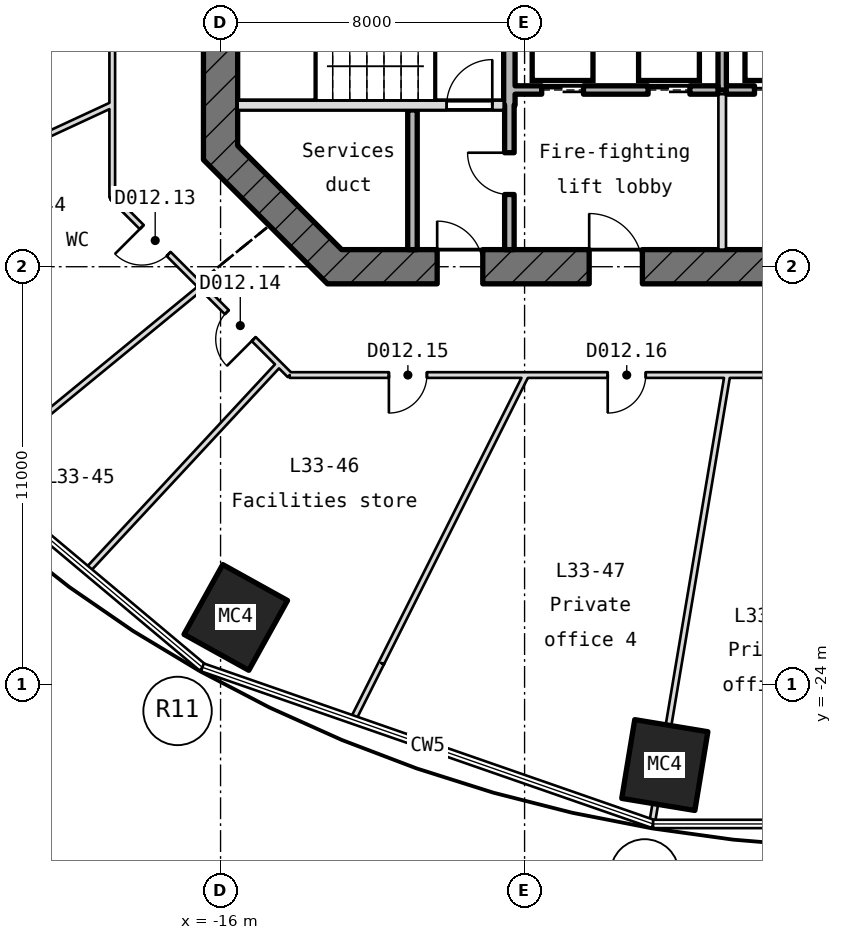
"""IFC4 building model, lengths in metres.
Left out: names, types, materials, properties, quantities, classifications, styles, units other than length and angle.
Written with IfcOpenShell. Run it as: python <this file> out.ifc"""

import sys

from ifc_helpers import new_model, si_unit, direction, frame, frame_2d, origin, origin_2d, place, context, subcontext, project, spatial, rectangle, hollow_rectangle, extrude, element, fill, save


model = new_model("IFC4")
c1 = context("Model", 3, precision=1e-05, world=origin(), true_north=direction((0.0, 1.0)))
c2 = subcontext(c1, "Body", "Model", "MODEL_VIEW")
j1 = project(units=[si_unit("LENGTHUNIT", "METRE"), si_unit("PLANEANGLEUNIT", "RADIAN")], contexts=[c1])
p1 = place(None, origin())
s1 = spatial("IfcSite", under=j1, at=p1, CompositionType="ELEMENT")
p2 = place(p1, origin())
s2 = spatial("IfcBuilding", under=s1, at=p2, CompositionType="ELEMENT")
p3 = place(p2, frame((0.0, 0.0, 155.65)))
s3 = spatial("IfcBuildingStorey", under=s2, at=p3, CompositionType="ELEMENT", Elevation=155.65)
for number, where, z_axis, x_axis in (
    (1, (-15.6, -22.228, -0.25), (0.0, 0.0, 1.0), (-0.874, 0.485, 0.0)),
    (2, (-4.31, -26.112, -0.25), (0.0, 0.0, 1.0), (-0.987, 0.163, 0.0)),
):
    element("IfcColumn", number, at=place(p3, frame(where, z_axis=z_axis, x_axis=x_axis)), inside=s3, PredefinedType="COLUMN", context=c2, shape_type="SweptSolid", body=[
        extrude(hollow_rectangle(XDim=1.95, YDim=2.1, WallThickness=0.075, at=origin_2d()), origin(), (0.0, 0.0, 1.0), 5.47),
    ])
p4 = place(p3, frame((-16.0, 10.186, -0.25), z_axis=(0.0, 0.0, 1.0), x_axis=(0.0, -1.0, 0.0)))
e3 = element("IfcWall", 3, at=p4, inside=s3, PredefinedType="SHEAR", context=c2, shape_type="SweptSolid", body=[
    extrude(rectangle(XDim=20.373, YDim=0.9, at=frame_2d((10.186, 0.0))), origin(), (0.0, 0.0, 1.0), 5.47),
])
p5 = place(p4, frame((8.986, 0.0, 0.25)))
e4 = element("IfcOpeningElement", 4, at=p5, cuts=e3, PredefinedType="OPENING", context=c2, shape_type="SweptSolid", body=[
    extrude(rectangle(XDim=2.4, YDim=2.1, at=frame_2d((1.2, 1.05))), frame((0.0, 0.46, 0.0), z_axis=(0.0, -1.0, 0.0), x_axis=(1.0, 0.0, 0.0)), (0.0, 0.0, 1.0), 0.92),
])
p6 = place(p4, frame((5.586, 0.0, 0.25)))
e5 = element("IfcOpeningElement", 5, at=p6, cuts=e3, PredefinedType="OPENING", context=c2, shape_type="SweptSolid", body=[
    extrude(rectangle(XDim=1.2, YDim=2.1, at=frame_2d((0.6, 1.05))), frame((0.0, 0.46, 0.0), z_axis=(0.0, -1.0, 0.0), x_axis=(1.0, 0.0, 0.0)), (0.0, 0.0, 1.0), 0.92),
])
p7 = place(p3, frame((-16.132, -9.868, -0.25), z_axis=(0.0, 0.0, 1.0), x_axis=(0.707106781187, -0.707106781187, 0.0)))
e6 = element("IfcWall", 6, at=p7, inside=s3, PredefinedType="SHEAR", context=c2, shape_type="SweptSolid", body=[
    extrude(rectangle(XDim=4.615, YDim=0.9, at=frame_2d((2.308, 0.0))), origin(), (0.0, 0.0, 1.0), 5.47),
])
p8 = place(p3, frame((-13.186, -13.0, -0.25), z_axis=(0.0, 0.0, 1.0), x_axis=(1.0, 0.0, 0.0)))
e7 = element("IfcWall", 7, at=p8, inside=s3, PredefinedType="SHEAR", context=c2, shape_type="SweptSolid", body=[
    extrude(rectangle(XDim=26.373, YDim=0.9, at=frame_2d((13.186, 0.0))), origin(), (0.0, 0.0, 1.0), 5.47),
])
p9 = place(p8, frame((2.886, 0.0, 0.25)))
e8 = element("IfcOpeningElement", 8, at=p9, cuts=e7, PredefinedType="OPENING", context=c2, shape_type="SweptSolid", body=[
    extrude(rectangle(XDim=1.2, YDim=2.1, at=frame_2d((0.6, 1.05))), frame((0.0, 0.46, 0.0), z_axis=(0.0, -1.0, 0.0), x_axis=(1.0, 0.0, 0.0)), (0.0, 0.0, 1.0), 0.92),
])
p10 = place(p8, frame((6.886, 0.0, 0.25)))
e9 = element("IfcOpeningElement", 9, at=p10, cuts=e7, PredefinedType="OPENING", context=c2, shape_type="SweptSolid", body=[
    extrude(rectangle(XDim=1.4, YDim=2.1, at=frame_2d((0.7, 1.05))), frame((0.0, 0.46, 0.0), z_axis=(0.0, -1.0, 0.0), x_axis=(1.0, 0.0, 0.0)), (0.0, 0.0, 1.0), 0.92),
])
p11 = place(p8, frame((15.486, 0.0, 0.25)))
e10 = element("IfcOpeningElement", 10, at=p11, cuts=e7, PredefinedType="OPENING", context=c2, shape_type="SweptSolid", body=[
    extrude(rectangle(XDim=1.4, YDim=2.1, at=frame_2d((0.7, 1.05))), frame((0.0, 0.46, 0.0), z_axis=(0.0, -1.0, 0.0), x_axis=(1.0, 0.0, 0.0)), (0.0, 0.0, 1.0), 0.92),
])
p12 = place(p3, frame((-15.55, -8.75, -0.25), z_axis=(0.0, 0.0, 1.0), x_axis=(1.0, 0.0, 0.0)))
e11 = element("IfcWall", 11, at=p12, inside=s3, PredefinedType="SHEAR", context=c2, shape_type="SweptSolid", body=[
    extrude(rectangle(XDim=7.0, YDim=0.25, at=frame_2d((3.5, 0.0))), origin(), (0.0, 0.0, 1.0), 5.47),
])
p13 = place(p12, frame((5.5, 0.0, 0.25)))
e12 = element("IfcOpeningElement", 12, at=p13, cuts=e11, PredefinedType="OPENING", context=c2, shape_type="SweptSolid", body=[
    extrude(rectangle(XDim=1.2, YDim=2.1, at=frame_2d((0.6, 1.05))), frame((0.0, 0.135, 0.0), z_axis=(0.0, -1.0, 0.0), x_axis=(1.0, 0.0, 0.0)), (0.0, 0.0, 1.0), 0.27),
])
p14 = place(p3, frame((-8.25, -8.35, 0.0), z_axis=(0.0, 0.0, 1.0), x_axis=(1.0, 0.0, 0.0)))
e13 = element("IfcWall", 13, at=p14, inside=s3, PredefinedType="STANDARD", context=c2, shape_type="SweptSolid", body=[
    extrude(rectangle(XDim=5.34, YDim=0.22, at=frame_2d((2.67, 0.0))), origin(), (0.0, 0.0, 1.0), 5.22),
])
p15 = place(p14, frame((0.7, 0.0, 0.0)))
e14 = element("IfcOpeningElement", 14, at=p15, cuts=e13, PredefinedType="OPENING", context=c2, shape_type="SweptSolid", body=[
    extrude(rectangle(XDim=1.1, YDim=2.1, at=frame_2d((0.55, 1.05))), frame((0.0, 0.12, 0.0), z_axis=(0.0, -1.0, 0.0), x_axis=(1.0, 0.0, 0.0)), (0.0, 0.0, 1.0), 0.24),
])
p16 = place(p14, frame((3.5, 0.0, 0.0)))
e15 = element("IfcOpeningElement", 15, at=p16, cuts=e13, PredefinedType="OPENING", context=c2, shape_type="SweptSolid", body=[
    extrude(rectangle(XDim=1.1, YDim=2.1, at=frame_2d((0.55, 1.05))), frame((0.0, 0.12, 0.0), z_axis=(0.0, -1.0, 0.0), x_axis=(1.0, 0.0, 0.0)), (0.0, 0.0, 1.0), 0.24),
])
p17 = place(p3, frame((-2.69, -8.35, 0.0), z_axis=(0.0, 0.0, 1.0), x_axis=(1.0, 0.0, 0.0)))
e16 = element("IfcWall", 16, at=p17, inside=s3, PredefinedType="STANDARD", context=c2, shape_type="SweptSolid", body=[
    extrude(rectangle(XDim=10.94, YDim=0.22, at=frame_2d((5.47, 0.0))), origin(), (0.0, 0.0, 1.0), 5.22),
])
p18 = place(p17, frame((0.74, 0.0, 0.0)))
e17 = element("IfcOpeningElement", 17, at=p18, cuts=e16, PredefinedType="OPENING", context=c2, shape_type="SweptSolid", body=[
    extrude(rectangle(XDim=1.1, YDim=2.1, at=frame_2d((0.55, 1.05))), frame((0.0, 0.12, 0.0), z_axis=(0.0, -1.0, 0.0), x_axis=(1.0, 0.0, 0.0)), (0.0, 0.0, 1.0), 0.24),
])
p19 = place(p17, frame((3.54, 0.0, 0.0)))
e18 = element("IfcOpeningElement", 18, at=p19, cuts=e16, PredefinedType="OPENING", context=c2, shape_type="SweptSolid", body=[
    extrude(rectangle(XDim=1.1, YDim=2.1, at=frame_2d((0.55, 1.05))), frame((0.0, 0.12, 0.0), z_axis=(0.0, -1.0, 0.0), x_axis=(1.0, 0.0, 0.0)), (0.0, 0.0, 1.0), 0.24),
])
p20 = place(p3, frame((-10.95, -12.55, 0.0), z_axis=(0.0, 0.0, 1.0), x_axis=(0.0, 1.0, 0.0)))
e19 = element("IfcWall", 19, at=p20, inside=s3, PredefinedType="STANDARD", context=c2, shape_type="SweptSolid", body=[
    extrude(rectangle(XDim=3.675, YDim=0.25, at=frame_2d((1.837, 0.0))), origin(), (0.0, 0.0, 1.0), 5.22),
])
p21 = place(p3, frame((-8.4, -12.55, 0.0), z_axis=(0.0, 0.0, 1.0), x_axis=(0.0, 1.0, 0.0)))
e20 = element("IfcWall", 20, at=p21, inside=s3, PredefinedType="STANDARD", context=c2, shape_type="SweptSolid", body=[
    extrude(rectangle(XDim=3.8, YDim=0.25, at=frame_2d((1.9, 0.0))), origin(), (0.0, 0.0, 1.0), 5.22),
])
p22 = place(p21, frame((1.45, 0.0, 0.0)))
e21 = element("IfcOpeningElement", 21, at=p22, cuts=e20, PredefinedType="OPENING", context=c2, shape_type="SweptSolid", body=[
    extrude(rectangle(XDim=1.1, YDim=2.1, at=frame_2d((0.55, 1.05))), frame((0.0, 0.135, 0.0), z_axis=(0.0, -1.0, 0.0), x_axis=(1.0, 0.0, 0.0)), (0.0, 0.0, 1.0), 0.27),
])
p23 = place(p3, frame((-8.4, -8.75, -0.25), z_axis=(0.0, 0.0, 1.0), x_axis=(0.0, 1.0, 0.0)))
e22 = element("IfcWall", 22, at=p23, inside=s3, PredefinedType="SHEAR", context=c2, shape_type="SweptSolid", body=[
    extrude(rectangle(XDim=6.25, YDim=0.3, at=frame_2d((3.125, 0.0))), origin(), (0.0, 0.0, 1.0), 5.47),
])
p24 = place(p3, frame((-2.8, -12.55, 0.0), z_axis=(0.0, 0.0, 1.0), x_axis=(0.0, 1.0, 0.0)))
e23 = element("IfcWall", 23, at=p24, inside=s3, PredefinedType="PARTITIONING", context=c2, shape_type="SweptSolid", body=[
    extrude(rectangle(XDim=4.09, YDim=0.2, at=frame_2d((2.045, 0.0))), origin(), (0.0, 0.0, 1.0), 5.22),
])
p25 = place(p3, frame((-2.8, -8.35, 0.0), z_axis=(0.0, 0.0, 1.0), x_axis=(0.0, 1.0, 0.0)))
e24 = element("IfcWall", 24, at=p25, inside=s3, PredefinedType="STANDARD", context=c2, shape_type="SweptSolid", body=[
    extrude(rectangle(XDim=2.89, YDim=0.22, at=frame_2d((1.445, 0.0))), origin(), (0.0, 0.0, 1.0), 5.22),
])
p26 = place(p3, frame((-14.18, -15.85, 0.0), z_axis=(0.0, 0.0, 1.0), x_axis=(1.0, 0.0, 0.0)))
e25 = element("IfcWall", 25, at=p26, inside=s3, PredefinedType="PARTITIONING", context=c2, shape_type="SweptSolid", body=[
    extrude(rectangle(XDim=28.361, YDim=0.15, at=frame_2d((14.18, 0.0))), origin(), (0.0, 0.0, 1.0), 5.22),
])
p27 = place(p26, frame((2.61, 0.0, 0.0)))
e26 = element("IfcOpeningElement", 26, at=p27, cuts=e25, PredefinedType="OPENING", context=c2, shape_type="SweptSolid", body=[
    extrude(rectangle(XDim=1.0, YDim=2.1, at=frame_2d((0.5, 1.05))), frame((0.0, 0.085, 0.0), z_axis=(0.0, -1.0, 0.0), x_axis=(1.0, 0.0, 0.0)), (0.0, 0.0, 1.0), 0.17),
])
p28 = place(p26, frame((8.368, 0.0, 0.0)))
e27 = element("IfcOpeningElement", 27, at=p28, cuts=e25, PredefinedType="OPENING", context=c2, shape_type="SweptSolid", body=[
    extrude(rectangle(XDim=1.0, YDim=2.1, at=frame_2d((0.5, 1.05))), frame((0.0, 0.085, 0.0), z_axis=(0.0, -1.0, 0.0), x_axis=(1.0, 0.0, 0.0)), (0.0, 0.0, 1.0), 0.17),
])
p29 = place(p26, frame((13.475, 0.0, 0.0)))
e28 = element("IfcOpeningElement", 28, at=p29, cuts=e25, PredefinedType="OPENING", context=c2, shape_type="SweptSolid", body=[
    extrude(rectangle(XDim=1.0, YDim=2.1, at=frame_2d((0.5, 1.05))), frame((0.0, 0.085, 0.0), z_axis=(0.0, -1.0, 0.0), x_axis=(1.0, 0.0, 0.0)), (0.0, 0.0, 1.0), 0.17),
])
p30 = place(p26, frame((18.479, 0.0, 0.0)))
e29 = element("IfcOpeningElement", 29, at=p30, cuts=e25, PredefinedType="OPENING", context=c2, shape_type="SweptSolid", body=[
    extrude(rectangle(XDim=1.0, YDim=2.1, at=frame_2d((0.5, 1.05))), frame((0.0, 0.085, 0.0), z_axis=(0.0, -1.0, 0.0), x_axis=(1.0, 0.0, 0.0)), (0.0, 0.0, 1.0), 0.17),
])
p31 = place(p26, frame((24.443, 0.0, 0.0)))
e30 = element("IfcOpeningElement", 30, at=p31, cuts=e25, PredefinedType="OPENING", context=c2, shape_type="SweptSolid", body=[
    extrude(rectangle(XDim=1.0, YDim=2.1, at=frame_2d((0.5, 1.05))), frame((0.0, 0.085, 0.0), z_axis=(0.0, -1.0, 0.0), x_axis=(1.0, 0.0, 0.0)), (0.0, 0.0, 1.0), 0.17),
])
p32 = place(p3, frame((-12.506, -24.9, 0.0), z_axis=(0.0, 0.0, 1.0), x_axis=(0.448873121894, 0.893595501578, 0.0)))
e31 = element("IfcWall", 31, at=p32, inside=s3, PredefinedType="PARTITIONING", context=c2, shape_type="SweptSolid", body=[
    extrude(rectangle(XDim=1.647, YDim=0.15, at=frame_2d((0.823, 0.0))), origin(), (0.0, 0.0, 1.0), 5.22),
])
p33 = place(p3, frame((-11.767, -23.429, 0.0), z_axis=(0.0, 0.0, 1.0), x_axis=(0.448824965696, 0.893619689895, 0.0)))
e32 = element("IfcWall", 32, at=p33, inside=s3, PredefinedType="PARTITIONING", context=c2, shape_type="SweptSolid", body=[
    extrude(rectangle(XDim=8.481, YDim=0.15, at=frame_2d((4.24, 0.0))), origin(), (0.0, 0.0, 1.0), 4.684),
])
p34 = place(p3, frame((-4.643, -27.632, 0.0), z_axis=(0.0, 0.0, 1.0), x_axis=(0.16573510633, 0.986170307062, 0.0)))
e33 = element("IfcWall", 33, at=p34, inside=s3, PredefinedType="PARTITIONING", context=c2, shape_type="SweptSolid", body=[
    extrude(rectangle(XDim=2.104, YDim=0.15, at=frame_2d((1.052, 0.0))), origin(), (0.0, 0.0, 1.0), 5.22),
])
p35 = place(p3, frame((-4.295, -25.557, 0.0), z_axis=(0.0, 0.0, 1.0), x_axis=(0.165706005705, 0.986175197251, 0.0)))
e34 = element("IfcWall", 34, at=p35, inside=s3, PredefinedType="PARTITIONING", context=c2, shape_type="SweptSolid", body=[
    extrude(rectangle(XDim=9.843, YDim=0.15, at=frame_2d((4.922, 0.0))), origin(), (0.0, 0.0, 1.0), 4.608),
])
p36 = place(p3, frame((-14.18, -15.85, 0.0), z_axis=(0.0, 0.0, 1.0), x_axis=(-0.707106781187, 0.707106781187, 0.0)))
e35 = element("IfcWall", 35, at=p36, inside=s3, PredefinedType="PARTITIONING", context=c2, shape_type="SweptSolid", body=[
    extrude(rectangle(XDim=0.406, YDim=0.15, at=frame_2d((0.203, 0.0))), origin(), (0.0, 0.0, 1.0), 5.22),
])
p37 = place(p3, frame((-25.691, -11.907, 0.0), z_axis=(0.0, 0.0, 1.0), x_axis=(0.90728349123, 0.420519519809, 0.0)))
e36 = element("IfcWall", 36, at=p37, inside=s3, PredefinedType="PARTITIONING", context=c2, shape_type="SweptSolid", body=[
    extrude(rectangle(XDim=7.541, YDim=0.15, at=frame_2d((3.77, 0.0))), origin(), (0.0, 0.0, 1.0), 4.684),
])
p38 = place(p3, frame((-22.506, -18.46, 0.0), z_axis=(0.0, 0.0, 1.0), x_axis=(0.773199383517, 0.634163002175, 0.0)))
e37 = element("IfcWall", 37, at=p38, inside=s3, PredefinedType="PARTITIONING", context=c2, shape_type="SweptSolid", body=[
    extrude(rectangle(XDim=7.77, YDim=0.15, at=frame_2d((3.885, 0.0))), origin(), (0.0, 0.0, 1.0), 5.22),
])
p39 = place(p3, frame((-19.497, -20.983, 0.0), z_axis=(0.0, 0.0, 1.0), x_axis=(0.680679019614, 0.732581785371, 0.0)))
e38 = element("IfcWall", 38, at=p39, inside=s3, PredefinedType="PARTITIONING", context=c2, shape_type="SweptSolid", body=[
    extrude(rectangle(XDim=7.394, YDim=0.15, at=frame_2d((3.697, 0.0))), origin(), (0.0, 0.0, 1.0), 5.22),
])
p40 = place(p3, frame((-18.85, -11.18, 0.0), z_axis=(0.0, 0.0, 1.0), x_axis=(0.0, 1.0, 0.0)))
e39 = element("IfcWall", 39, at=p40, inside=s3, PredefinedType="PARTITIONING", context=c2, shape_type="SweptSolid", body=[
    extrude(rectangle(XDim=7.502, YDim=0.15, at=frame_2d((3.751, 0.0))), origin(), (0.0, 0.0, 1.0), 5.22),
])
p41 = place(p40, frame((4.471, 0.0, 0.0)))
e40 = element("IfcOpeningElement", 40, at=p41, cuts=e39, PredefinedType="OPENING", context=c2, shape_type="SweptSolid", body=[
    extrude(rectangle(XDim=1.0, YDim=2.1, at=frame_2d((0.5, 1.05))), frame((0.0, 0.085, 0.0), z_axis=(0.0, -1.0, 0.0), x_axis=(1.0, 0.0, 0.0)), (0.0, 0.0, 1.0), 0.17),
])
p42 = place(p3, frame((-14.46, -15.57, 0.0), z_axis=(0.0, 0.0, 1.0), x_axis=(-0.707106781187, 0.707106781187, 0.0)))
e41 = element("IfcWall", 41, at=p42, inside=s3, PredefinedType="PARTITIONING", context=c2, shape_type="SweptSolid", body=[
    extrude(rectangle(XDim=6.208, YDim=0.15, at=frame_2d((3.104, 0.0))), origin(), (0.0, 0.0, 1.0), 5.22),
])
p43 = place(p42, frame((4.11, 0.0, 0.0)))
e42 = element("IfcOpeningElement", 42, at=p43, cuts=e41, PredefinedType="OPENING", context=c2, shape_type="SweptSolid", body=[
    extrude(rectangle(XDim=1.0, YDim=2.1, at=frame_2d((0.5, 1.05))), frame((0.0, 0.085, 0.0), z_axis=(0.0, -1.0, 0.0), x_axis=(1.0, 0.0, 0.0)), (0.0, 0.0, 1.0), 0.17),
])
p44 = place(p42, frame((0.943, 0.0, 0.0)))
e43 = element("IfcOpeningElement", 43, at=p44, cuts=e41, PredefinedType="OPENING", context=c2, shape_type="SweptSolid", body=[
    extrude(rectangle(XDim=1.0, YDim=2.1, at=frame_2d((0.5, 1.05))), frame((0.0, 0.085, 0.0), z_axis=(0.0, -1.0, 0.0), x_axis=(1.0, 0.0, 0.0)), (0.0, 0.0, 1.0), 0.17),
])
p45 = place(p15, origin())
e44 = element("IfcDoor", 44, at=p45, inside=s3, OperationType="DOUBLE_DOOR_SLIDING", PredefinedType="DOOR", context=c2, shape_type="SweptSolid", body=[
    extrude(rectangle(XDim=1.1, YDim=2.1, at=frame_2d((0.55, 1.05))), frame((0.0, 0.025, 0.0), z_axis=(0.0, -1.0, 0.0), x_axis=(1.0, 0.0, 0.0)), (0.0, 0.0, 1.0), 0.05),
])
fill(e14, e44)
p46 = place(p16, origin())
e45 = element("IfcDoor", 45, at=p46, inside=s3, OperationType="DOUBLE_DOOR_SLIDING", PredefinedType="DOOR", context=c2, shape_type="SweptSolid", body=[
    extrude(rectangle(XDim=1.1, YDim=2.1, at=frame_2d((0.55, 1.05))), frame((0.0, 0.025, 0.0), z_axis=(0.0, -1.0, 0.0), x_axis=(1.0, 0.0, 0.0)), (0.0, 0.0, 1.0), 0.05),
])
fill(e15, e45)
p47 = place(p18, origin())
e46 = element("IfcDoor", 46, at=p47, inside=s3, OperationType="DOUBLE_DOOR_SLIDING", PredefinedType="DOOR", context=c2, shape_type="SweptSolid", body=[
    extrude(rectangle(XDim=1.1, YDim=2.1, at=frame_2d((0.55, 1.05))), frame((0.0, 0.025, 0.0), z_axis=(0.0, -1.0, 0.0), x_axis=(1.0, 0.0, 0.0)), (0.0, 0.0, 1.0), 0.05),
])
fill(e17, e46)
p48 = place(p13, origin())
e47 = element("IfcDoor", 47, at=p48, inside=s3, OperationType="SINGLE_SWING_RIGHT", PredefinedType="DOOR", context=c2, shape_type="SweptSolid", body=[
    extrude(rectangle(XDim=1.2, YDim=2.1, at=frame_2d((0.6, 1.05))), frame((0.0, 0.025, 0.0), z_axis=(0.0, -1.0, 0.0), x_axis=(1.0, 0.0, 0.0)), (0.0, 0.0, 1.0), 0.05),
])
fill(e12, e47)
p49 = place(p22, origin())
e48 = element("IfcDoor", 48, at=p49, inside=s3, OperationType="SINGLE_SWING_RIGHT", PredefinedType="DOOR", context=c2, shape_type="SweptSolid", body=[
    extrude(rectangle(XDim=1.1, YDim=2.1, at=frame_2d((0.55, 1.05))), frame((0.0, 0.025, 0.0), z_axis=(0.0, -1.0, 0.0), x_axis=(1.0, 0.0, 0.0)), (0.0, 0.0, 1.0), 0.05),
])
fill(e21, e48)
p50 = place(p9, origin())
e49 = element("IfcDoor", 49, at=p50, inside=s3, OperationType="SINGLE_SWING_RIGHT", PredefinedType="DOOR", context=c2, shape_type="SweptSolid", body=[
    extrude(rectangle(XDim=1.2, YDim=2.1, at=frame_2d((0.6, 1.05))), frame((0.0, 0.025, 0.0), z_axis=(0.0, -1.0, 0.0), x_axis=(1.0, 0.0, 0.0)), (0.0, 0.0, 1.0), 0.05),
])
fill(e8, e49)
p51 = place(p10, origin())
e50 = element("IfcDoor", 50, at=p51, inside=s3, OperationType="SINGLE_SWING_RIGHT", PredefinedType="DOOR", context=c2, shape_type="SweptSolid", body=[
    extrude(rectangle(XDim=1.4, YDim=2.1, at=frame_2d((0.7, 1.05))), frame((0.0, 0.025, 0.0), z_axis=(0.0, -1.0, 0.0), x_axis=(1.0, 0.0, 0.0)), (0.0, 0.0, 1.0), 0.05),
])
fill(e9, e50)
p52 = place(p43, origin())
e51 = element("IfcDoor", 51, at=p52, inside=s3, OperationType="SINGLE_SWING_RIGHT", PredefinedType="DOOR", context=c2, shape_type="SweptSolid", body=[
    extrude(rectangle(XDim=1.0, YDim=2.1, at=frame_2d((0.5, 1.05))), frame((0.0, 0.025, 0.0), z_axis=(0.0, -1.0, 0.0), x_axis=(1.0, 0.0, 0.0)), (0.0, 0.0, 1.0), 0.05),
])
fill(e42, e51)
p53 = place(p44, origin())
e52 = element("IfcDoor", 52, at=p53, inside=s3, OperationType="SINGLE_SWING_RIGHT", PredefinedType="DOOR", context=c2, shape_type="SweptSolid", body=[
    extrude(rectangle(XDim=1.0, YDim=2.1, at=frame_2d((0.5, 1.05))), frame((0.0, 0.025, 0.0), z_axis=(0.0, -1.0, 0.0), x_axis=(1.0, 0.0, 0.0)), (0.0, 0.0, 1.0), 0.05),
])
fill(e43, e52)
p54 = place(p27, frame((1.0, 0.0, 0.0), z_axis=(0.0, 0.0, 1.0), x_axis=(-1.0, 0.0, 0.0)))
e53 = element("IfcDoor", 53, at=p54, inside=s3, OperationType="SINGLE_SWING_LEFT", PredefinedType="DOOR", context=c2, shape_type="SweptSolid", body=[
    extrude(rectangle(XDim=1.0, YDim=2.1, at=frame_2d((0.5, 1.05))), frame((0.0, 0.025, 0.0), z_axis=(0.0, -1.0, 0.0), x_axis=(1.0, 0.0, 0.0)), (0.0, 0.0, 1.0), 0.05),
])
fill(e26, e53)
p55 = place(p28, frame((1.0, 0.0, 0.0), z_axis=(0.0, 0.0, 1.0), x_axis=(-1.0, 0.0, 0.0)))
e54 = element("IfcDoor", 54, at=p55, inside=s3, OperationType="SINGLE_SWING_LEFT", PredefinedType="DOOR", context=c2, shape_type="SweptSolid", body=[
    extrude(rectangle(XDim=1.0, YDim=2.1, at=frame_2d((0.5, 1.05))), frame((0.0, 0.025, 0.0), z_axis=(0.0, -1.0, 0.0), x_axis=(1.0, 0.0, 0.0)), (0.0, 0.0, 1.0), 0.05),
])
fill(e27, e54)
save(model, sys.argv[1])
